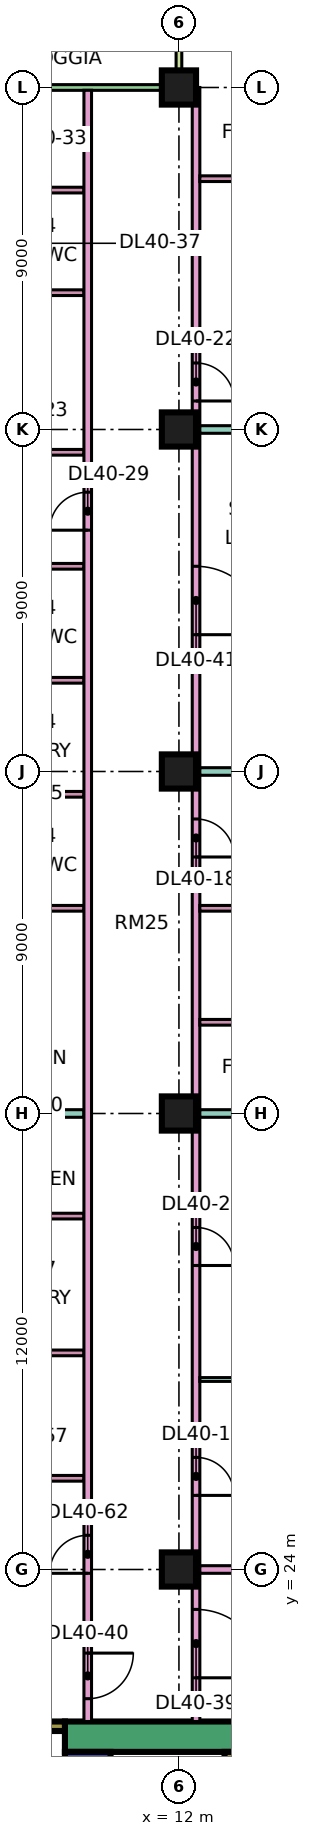
"""IFC4 building model, lengths in metres.
Left out: names, types, materials, properties, quantities, classifications, styles, units other than length and angle.
Written with IfcOpenShell. Run it as: python <this file> out.ifc"""

import sys

from ifc_helpers import new_model, si_unit, direction, frame, frame_2d, origin, origin_2d, place, context, subcontext, project, spatial, rectangle, extrude, element, fill, save


model = new_model("IFC4")
c1 = context("Model", 3, precision=1e-05, world=origin(), true_north=direction((0.0, 1.0)))
c2 = subcontext(c1, "Body", "Model", "MODEL_VIEW")
j1 = project(units=[si_unit("LENGTHUNIT", "METRE"), si_unit("PLANEANGLEUNIT", "RADIAN")], contexts=[c1])
p1 = place(None, origin())
s1 = spatial("IfcSite", under=j1, at=p1, CompositionType="ELEMENT")
p2 = place(p1, origin())
s2 = spatial("IfcBuilding", under=s1, at=p2, CompositionType="ELEMENT")
p3 = place(p2, frame((0.0, 0.0, 176.15)))
s3 = spatial("IfcBuildingStorey", under=s2, at=p3, CompositionType="ELEMENT", Elevation=176.15)
for number, where, z_axis, x_axis in (
    (1, (12.0, 24.0, 0.0), (0.0, 0.0, 1.0), (1.0, 0.0, 0.0)),
    (2, (12.0, 36.0, 0.0), (0.0, 0.0, 1.0), (1.0, 0.0, 0.0)),
    (3, (12.0, 45.0, 0.0), (0.0, 0.0, 1.0), (1.0, 0.0, 0.0)),
    (4, (12.0, 54.0, 0.0), (0.0, 0.0, 1.0), (1.0, 0.0, 0.0)),
    (5, (12.0, 63.0, 0.0), (0.0, 0.0, 1.0), (1.0, 0.0, 0.0)),
):
    element("IfcColumn", number, at=place(p3, frame(where, z_axis=z_axis, x_axis=x_axis)), inside=s3, PredefinedType="COLUMN", context=c2, shape_type="SweptSolid", body=[
        extrude(rectangle(XDim=0.9, YDim=0.9, at=origin_2d()), origin(), (0.0, 0.0, 1.0), 3.75),
    ])
p4 = place(p3, frame((9.0, 19.6, 0.0), z_axis=(0.0, 0.0, 1.0), x_axis=(1.0, 0.0, 0.0)))
e6 = element("IfcWall", 6, at=p4, inside=s3, PredefinedType="SHEAR", context=c2, shape_type="SweptSolid", body=[
    extrude(rectangle(XDim=25.0, YDim=0.8, at=frame_2d((12.5, 0.0))), origin(), (0.0, 0.0, 1.0), 3.75),
])
p5 = place(p4, frame((19.1, 0.0, 0.0)))
e7 = element("IfcOpeningElement", 7, at=p5, cuts=e6, PredefinedType="OPENING", context=c2, shape_type="SweptSolid", body=[
    extrude(rectangle(XDim=1.8, YDim=2.4, at=frame_2d((0.9, 1.2))), frame((0.0, 0.41, 0.0), z_axis=(0.0, -1.0, 0.0), x_axis=(1.0, 0.0, 0.0)), (0.0, 0.0, 1.0), 0.82),
])
p6 = place(p3, frame((9.6, 7.8, 0.0), z_axis=(0.0, 0.0, 1.0), x_axis=(0.0, 1.0, 0.0)))
e8 = element("IfcWall", 8, at=p6, inside=s3, PredefinedType="SHEAR", context=c2, shape_type="SweptSolid", body=[
    extrude(rectangle(XDim=11.4, YDim=1.2, at=frame_2d((5.7, 0.0))), origin(), (0.0, 0.0, 1.0), 3.75),
])
p7 = place(p6, frame((4.075, 0.0, 0.0)))
e9 = element("IfcOpeningElement", 9, at=p7, cuts=e8, PredefinedType="OPENING", context=c2, shape_type="SweptSolid", body=[
    extrude(rectangle(XDim=1.1, YDim=2.2, at=frame_2d((0.55, 1.1))), frame((0.0, 0.61, 0.0), z_axis=(0.0, -1.0, 0.0), x_axis=(1.0, 0.0, 0.0)), (0.0, 0.0, 1.0), 1.22),
])
p8 = place(p6, frame((6.575, 0.0, 0.0)))
e10 = element("IfcOpeningElement", 10, at=p8, cuts=e8, PredefinedType="OPENING", context=c2, shape_type="SweptSolid", body=[
    extrude(rectangle(XDim=1.1, YDim=2.2, at=frame_2d((0.55, 1.1))), frame((0.0, 0.61, 0.0), z_axis=(0.0, -1.0, 0.0), x_axis=(1.0, 0.0, 0.0)), (0.0, 0.0, 1.0), 1.22),
])
p9 = place(p6, frame((9.4, 0.0, 0.0)))
e11 = element("IfcOpeningElement", 11, at=p9, cuts=e8, PredefinedType="OPENING", context=c2, shape_type="SweptSolid", body=[
    extrude(rectangle(XDim=1.1, YDim=2.2, at=frame_2d((0.55, 1.1))), frame((0.0, 0.61, 0.0), z_axis=(0.0, -1.0, 0.0), x_axis=(1.0, 0.0, 0.0)), (0.0, 0.0, 1.0), 1.22),
])
p10 = place(p6, frame((1.75, 0.0, 0.0)))
e12 = element("IfcOpeningElement", 12, at=p10, cuts=e8, PredefinedType="OPENING", context=c2, shape_type="SweptSolid", body=[
    extrude(rectangle(XDim=0.9, YDim=2.1, at=frame_2d((0.45, 1.05))), frame((0.0, 0.61, 0.0), z_axis=(0.0, -1.0, 0.0), x_axis=(1.0, 0.0, 0.0)), (0.0, 0.0, 1.0), 1.22),
])
p11 = place(p3, frame((13.325, 7.8, 0.0), z_axis=(0.0, 0.0, 1.0), x_axis=(0.0, 1.0, 0.0)))
e13 = element("IfcWall", 13, at=p11, inside=s3, PredefinedType="SHEAR", context=c2, shape_type="SweptSolid", body=[
    extrude(rectangle(XDim=11.4, YDim=0.25, at=frame_2d((5.7, 0.0))), origin(), (0.0, 0.0, 1.0), 3.75),
])
p12 = place(p3, frame((2.1, 19.875, 0.0), z_axis=(0.0, 0.0, 1.0), x_axis=(1.0, 0.0, 0.0)))
e14 = element("IfcWall", 14, at=p12, inside=s3, PredefinedType="SHEAR", context=c2, shape_type="SweptSolid", body=[
    extrude(rectangle(XDim=6.9, YDim=0.25, at=frame_2d((3.45, 0.0))), origin(), (0.0, 0.0, 1.0), 3.75),
])
p13 = place(p12, frame((1.175, 0.0, 0.0)))
e15 = element("IfcOpeningElement", 15, at=p13, cuts=e14, PredefinedType="OPENING", context=c2, shape_type="SweptSolid", body=[
    extrude(rectangle(XDim=1.1, YDim=2.2, at=frame_2d((0.55, 1.1))), frame((0.0, 0.135, 0.0), z_axis=(0.0, -1.0, 0.0), x_axis=(1.0, 0.0, 0.0)), (0.0, 0.0, 1.0), 0.27),
])
p14 = place(p12, frame((4.6, 0.0, 0.0)))
e16 = element("IfcOpeningElement", 16, at=p14, cuts=e14, PredefinedType="OPENING", context=c2, shape_type="SweptSolid", body=[
    extrude(rectangle(XDim=1.2, YDim=2.2, at=frame_2d((0.6, 1.1))), frame((0.0, 0.135, 0.0), z_axis=(0.0, -1.0, 0.0), x_axis=(1.0, 0.0, 0.0)), (0.0, 0.0, 1.0), 0.27),
])
p15 = place(p3, frame((11.925, 63.0, 0.0), z_axis=(0.0, 0.0, 1.0), x_axis=(-1.0, 0.0, 0.0)))
e17 = element("IfcWall", 17, at=p15, inside=s3, PredefinedType="SOLIDWALL", context=c2, shape_type="SweptSolid", body=[
    extrude(rectangle(XDim=10.35, YDim=0.15, at=frame_2d((5.175, 0.0))), origin(), (0.0, 0.0, 1.0), 3.35),
])
p16 = place(p15, frame((7.688, 0.0, 0.0)))
e18 = element("IfcOpeningElement", 18, at=p16, cuts=e17, PredefinedType="OPENING", context=c2, shape_type="SweptSolid", body=[
    extrude(rectangle(XDim=1.8, YDim=2.4, at=frame_2d((0.9, 1.2))), frame((0.0, 0.085, 0.0), z_axis=(0.0, -1.0, 0.0), x_axis=(1.0, 0.0, 0.0)), (0.0, 0.0, 1.0), 0.17),
])
p17 = place(p3, frame((12.0, 64.5, 0.0), z_axis=(0.0, 0.0, 1.0), x_axis=(0.0, -1.0, 0.0)))
e19 = element("IfcWall", 19, at=p17, inside=s3, PredefinedType="SOLIDWALL", context=c2, shape_type="SweptSolid", body=[
    extrude(rectangle(XDim=1.5, YDim=0.15, at=frame_2d((0.75, 0.0))), origin(), (0.0, 0.0, 1.0), 3.35),
])
p18 = place(p3, frame((-1.35, 22.4, 0.0), z_axis=(0.0, 0.0, 1.0), x_axis=(1.0, 0.0, 0.0)))
e20 = element("IfcWall", 20, at=p18, inside=s3, PredefinedType="PARTITIONING", context=c2, shape_type="SweptSolid", body=[
    extrude(rectangle(XDim=10.85, YDim=0.2, at=frame_2d((5.425, 0.0))), origin(), (0.0, 0.0, 1.0), 3.35),
])
p19 = place(p3, frame((0.0, 36.0, 0.0), z_axis=(0.0, 0.0, 1.0), x_axis=(1.0, 0.0, 0.0)))
e21 = element("IfcWall", 21, at=p19, inside=s3, PredefinedType="PARTITIONING", context=c2, shape_type="SweptSolid", body=[
    extrude(rectangle(XDim=9.5, YDim=0.2, at=frame_2d((4.75, 0.0))), origin(), (0.0, 0.0, 1.0), 3.35),
])
p20 = place(p3, frame((6.375, 26.4, 0.0), z_axis=(0.0, 0.0, 1.0), x_axis=(1.0, 0.0, 0.0)))
e22 = element("IfcWall", 22, at=p20, inside=s3, PredefinedType="PARTITIONING", context=c2, shape_type="SweptSolid", body=[
    extrude(rectangle(XDim=3.125, YDim=0.15, at=frame_2d((1.562, 0.0))), origin(), (0.0, 0.0, 1.0), 3.35),
])
p21 = place(p20, frame((1.225, 0.0, 0.0)))
e23 = element("IfcOpeningElement", 23, at=p21, cuts=e22, PredefinedType="OPENING", context=c2, shape_type="SweptSolid", body=[
    extrude(rectangle(XDim=0.8, YDim=2.1, at=frame_2d((0.4, 1.05))), frame((0.0, 0.085, 0.0), z_axis=(0.0, -1.0, 0.0), x_axis=(1.0, 0.0, 0.0)), (0.0, 0.0, 1.0), 0.17),
])
for number, where, z_axis, x_axis in (
    (24, (6.375, 29.7, 0.0), (0.0, 0.0, 1.0), (1.0, 0.0, 0.0)),
    (25, (6.375, 33.3, 0.0), (0.0, 0.0, 1.0), (1.0, 0.0, 0.0)),
    (26, (6.375, 41.4, 0.0), (0.0, 0.0, 1.0), (1.0, 0.0, 0.0)),
    (27, (6.375, 44.4, 0.0), (0.0, 0.0, 1.0), (1.0, 0.0, 0.0)),
    (28, (6.375, 47.4, 0.0), (0.0, 0.0, 1.0), (1.0, 0.0, 0.0)),
    (29, (6.375, 50.4, 0.0), (0.0, 0.0, 1.0), (1.0, 0.0, 0.0)),
):
    element("IfcWall", number, at=place(p3, frame(where, z_axis=z_axis, x_axis=x_axis)), inside=s3, PredefinedType="PARTITIONING", context=c2, shape_type="SweptSolid", body=[
        extrude(rectangle(XDim=3.125, YDim=0.15, at=frame_2d((1.562, 0.0))), origin(), (0.0, 0.0, 1.0), 3.35),
    ])
p22 = place(p3, frame((6.375, 53.4, 0.0), z_axis=(0.0, 0.0, 1.0), x_axis=(1.0, 0.0, 0.0)))
e30 = element("IfcWall", 30, at=p22, inside=s3, PredefinedType="PARTITIONING", context=c2, shape_type="SweptSolid", body=[
    extrude(rectangle(XDim=3.125, YDim=0.15, at=frame_2d((1.562, 0.0))), origin(), (0.0, 0.0, 1.0), 3.35),
])
p23 = place(p22, frame((1.225, 0.0, 0.0)))
e31 = element("IfcOpeningElement", 31, at=p23, cuts=e30, PredefinedType="OPENING", context=c2, shape_type="SweptSolid", body=[
    extrude(rectangle(XDim=0.8, YDim=2.1, at=frame_2d((0.4, 1.05))), frame((0.0, 0.085, 0.0), z_axis=(0.0, -1.0, 0.0), x_axis=(1.0, 0.0, 0.0)), (0.0, 0.0, 1.0), 0.17),
])
for number, where, z_axis, x_axis in (
    (32, (6.375, 57.6, 0.0), (0.0, 0.0, 1.0), (1.0, 0.0, 0.0)),
    (33, (6.375, 60.3, 0.0), (0.0, 0.0, 1.0), (1.0, 0.0, 0.0)),
):
    element("IfcWall", number, at=place(p3, frame(where, z_axis=z_axis, x_axis=x_axis)), inside=s3, PredefinedType="PARTITIONING", context=c2, shape_type="SweptSolid", body=[
        extrude(rectangle(XDim=3.125, YDim=0.15, at=frame_2d((1.562, 0.0))), origin(), (0.0, 0.0, 1.0), 3.35),
    ])
p24 = place(p3, frame((9.6, 20.0, 0.0), z_axis=(0.0, 0.0, 1.0), x_axis=(0.0, 1.0, 0.0)))
e34 = element("IfcWall", 34, at=p24, inside=s3, PredefinedType="PARTITIONING", context=c2, shape_type="SweptSolid", body=[
    extrude(rectangle(XDim=42.926, YDim=0.2, at=frame_2d((21.463, 0.0))), origin(), (0.0, 0.0, 1.0), 3.35),
])
p25 = place(p24, frame((31.35, 0.0, 0.0)))
e35 = element("IfcOpeningElement", 35, at=p25, cuts=e34, PredefinedType="OPENING", context=c2, shape_type="SweptSolid", body=[
    extrude(rectangle(XDim=1.0, YDim=2.1, at=frame_2d((0.5, 1.05))), frame((0.0, 0.11, 0.0), z_axis=(0.0, -1.0, 0.0), x_axis=(1.0, 0.0, 0.0)), (0.0, 0.0, 1.0), 0.22),
])
p26 = place(p24, frame((0.6, 0.0, 0.0)))
e36 = element("IfcOpeningElement", 36, at=p26, cuts=e34, PredefinedType="OPENING", context=c2, shape_type="SweptSolid", body=[
    extrude(rectangle(XDim=1.2, YDim=2.1, at=frame_2d((0.6, 1.05))), frame((0.0, 0.11, 0.0), z_axis=(0.0, -1.0, 0.0), x_axis=(1.0, 0.0, 0.0)), (0.0, 0.0, 1.0), 0.22),
])
p27 = place(p24, frame((3.9, 0.0, 0.0)))
e37 = element("IfcOpeningElement", 37, at=p27, cuts=e34, PredefinedType="OPENING", context=c2, shape_type="SweptSolid", body=[
    extrude(rectangle(XDim=1.0, YDim=2.1, at=frame_2d((0.5, 1.05))), frame((0.0, 0.11, 0.0), z_axis=(0.0, -1.0, 0.0), x_axis=(1.0, 0.0, 0.0)), (0.0, 0.0, 1.0), 0.22),
])
p28 = place(p3, frame((12.45, 20.0, 0.0), z_axis=(0.0, 0.0, 1.0), x_axis=(0.0, 1.0, 0.0)))
e38 = element("IfcWall", 38, at=p28, inside=s3, PredefinedType="PARTITIONING", context=c2, shape_type="SweptSolid", body=[
    extrude(rectangle(XDim=43.0, YDim=0.2, at=frame_2d((21.5, 0.0))), origin(), (0.0, 0.0, 1.0), 3.35),
])
p29 = place(p28, frame((5.95, 0.0, 0.0)))
e39 = element("IfcOpeningElement", 39, at=p29, cuts=e38, PredefinedType="OPENING", context=c2, shape_type="SweptSolid", body=[
    extrude(rectangle(XDim=1.0, YDim=2.1, at=frame_2d((0.5, 1.05))), frame((0.0, 0.11, 0.0), z_axis=(0.0, -1.0, 0.0), x_axis=(1.0, 0.0, 0.0)), (0.0, 0.0, 1.0), 0.22),
])
p30 = place(p28, frame((12.0, 0.0, 0.0)))
e40 = element("IfcOpeningElement", 40, at=p30, cuts=e38, PredefinedType="OPENING", context=c2, shape_type="SweptSolid", body=[
    extrude(rectangle(XDim=1.0, YDim=2.1, at=frame_2d((0.5, 1.05))), frame((0.0, 0.11, 0.0), z_axis=(0.0, -1.0, 0.0), x_axis=(1.0, 0.0, 0.0)), (0.0, 0.0, 1.0), 0.22),
])
p31 = place(p28, frame((22.75, 0.0, 0.0)))
e41 = element("IfcOpeningElement", 41, at=p31, cuts=e38, PredefinedType="OPENING", context=c2, shape_type="SweptSolid", body=[
    extrude(rectangle(XDim=1.0, YDim=2.1, at=frame_2d((0.5, 1.05))), frame((0.0, 0.11, 0.0), z_axis=(0.0, -1.0, 0.0), x_axis=(1.0, 0.0, 0.0)), (0.0, 0.0, 1.0), 0.22),
])
p32 = place(p28, frame((34.75, 0.0, 0.0)))
e42 = element("IfcOpeningElement", 42, at=p32, cuts=e38, PredefinedType="OPENING", context=c2, shape_type="SweptSolid", body=[
    extrude(rectangle(XDim=1.0, YDim=2.1, at=frame_2d((0.5, 1.05))), frame((0.0, 0.11, 0.0), z_axis=(0.0, -1.0, 0.0), x_axis=(1.0, 0.0, 0.0)), (0.0, 0.0, 1.0), 0.22),
])
p33 = place(p28, frame((1.15, 0.0, 0.0)))
e43 = element("IfcOpeningElement", 43, at=p33, cuts=e38, PredefinedType="OPENING", context=c2, shape_type="SweptSolid", body=[
    extrude(rectangle(XDim=1.8, YDim=2.1, at=frame_2d((0.9, 1.05))), frame((0.0, 0.11, 0.0), z_axis=(0.0, -1.0, 0.0), x_axis=(1.0, 0.0, 0.0)), (0.0, 0.0, 1.0), 0.22),
])
p34 = place(p28, frame((28.6, 0.0, 0.0)))
e44 = element("IfcOpeningElement", 44, at=p34, cuts=e38, PredefinedType="OPENING", context=c2, shape_type="SweptSolid", body=[
    extrude(rectangle(XDim=1.8, YDim=2.1, at=frame_2d((0.9, 1.05))), frame((0.0, 0.11, 0.0), z_axis=(0.0, -1.0, 0.0), x_axis=(1.0, 0.0, 0.0)), (0.0, 0.0, 1.0), 0.22),
])
p35 = place(p3, frame((12.55, 24.0, 0.0), z_axis=(0.0, 0.0, 1.0), x_axis=(1.0, 0.0, 0.0)))
e45 = element("IfcWall", 45, at=p35, inside=s3, PredefinedType="PARTITIONING", context=c2, shape_type="SweptSolid", body=[
    extrude(rectangle(XDim=8.95, YDim=0.2, at=frame_2d((4.475, 0.0))), origin(), (0.0, 0.0, 1.0), 3.35),
])
p36 = place(p3, frame((12.55, 29.0, 0.0), z_axis=(0.0, 0.0, 1.0), x_axis=(1.0, 0.0, 0.0)))
e46 = element("IfcWall", 46, at=p36, inside=s3, PredefinedType="PARTITIONING", context=c2, shape_type="SweptSolid", body=[
    extrude(rectangle(XDim=8.95, YDim=0.1, at=frame_2d((4.475, 0.0))), origin(), (0.0, 0.0, 1.0), 3.35),
])
p37 = place(p3, frame((12.55, 36.0, 0.0), z_axis=(0.0, 0.0, 1.0), x_axis=(1.0, 0.0, 0.0)))
e47 = element("IfcWall", 47, at=p37, inside=s3, PredefinedType="PARTITIONING", context=c2, shape_type="SweptSolid", body=[
    extrude(rectangle(XDim=11.45, YDim=0.2, at=frame_2d((5.725, 0.0))), origin(), (0.0, 0.0, 1.0), 3.35),
])
p38 = place(p3, frame((12.55, 38.4, 0.0), z_axis=(0.0, 0.0, 1.0), x_axis=(1.0, 0.0, 0.0)))
e48 = element("IfcWall", 48, at=p38, inside=s3, PredefinedType="PARTITIONING", context=c2, shape_type="SweptSolid", body=[
    extrude(rectangle(XDim=5.225, YDim=0.15, at=frame_2d((2.612, 0.0))), origin(), (0.0, 0.0, 1.0), 3.35),
])
p39 = place(p3, frame((12.55, 41.4, 0.0), z_axis=(0.0, 0.0, 1.0), x_axis=(1.0, 0.0, 0.0)))
e49 = element("IfcWall", 49, at=p39, inside=s3, PredefinedType="PARTITIONING", context=c2, shape_type="SweptSolid", body=[
    extrude(rectangle(XDim=5.375, YDim=0.15, at=frame_2d((2.688, 0.0))), origin(), (0.0, 0.0, 1.0), 3.35),
])
p40 = place(p3, frame((12.55, 45.0, 0.0), z_axis=(0.0, 0.0, 1.0), x_axis=(1.0, 0.0, 0.0)))
e50 = element("IfcWall", 50, at=p40, inside=s3, PredefinedType="PARTITIONING", context=c2, shape_type="SweptSolid", body=[
    extrude(rectangle(XDim=11.45, YDim=0.2, at=frame_2d((5.725, 0.0))), origin(), (0.0, 0.0, 1.0), 3.35),
])
p41 = place(p3, frame((12.55, 54.0, 0.0), z_axis=(0.0, 0.0, 1.0), x_axis=(1.0, 0.0, 0.0)))
e51 = element("IfcWall", 51, at=p41, inside=s3, PredefinedType="PARTITIONING", context=c2, shape_type="SweptSolid", body=[
    extrude(rectangle(XDim=11.376, YDim=0.2, at=frame_2d((5.688, 0.0))), origin(), (0.0, 0.0, 1.0), 3.35),
])
for number, where, z_axis, x_axis in (
    (52, (12.55, 56.4, 0.0), (0.0, 0.0, 1.0), (1.0, 0.0, 0.0)),
    (53, (12.55, 60.6, 0.0), (0.0, 0.0, 1.0), (1.0, 0.0, 0.0)),
):
    element("IfcWall", number, at=place(p3, frame(where, z_axis=z_axis, x_axis=x_axis)), inside=s3, PredefinedType="PARTITIONING", context=c2, shape_type="SweptSolid", body=[
        extrude(rectangle(XDim=5.225, YDim=0.15, at=frame_2d((2.612, 0.0))), origin(), (0.0, 0.0, 1.0), 3.35),
    ])
p42 = place(p29, frame((1.0, 0.0, 0.0), z_axis=(0.0, 0.0, 1.0), x_axis=(-1.0, 0.0, 0.0)))
e54 = element("IfcDoor", 54, at=p42, inside=s3, OperationType="SINGLE_SWING_LEFT", PredefinedType="DOOR", context=c2, shape_type="SweptSolid", body=[
    extrude(rectangle(XDim=1.0, YDim=2.1, at=frame_2d((0.5, 1.05))), frame((0.0, 0.025, 0.0), z_axis=(0.0, -1.0, 0.0), x_axis=(1.0, 0.0, 0.0)), (0.0, 0.0, 1.0), 0.05),
])
fill(e39, e54)
p43 = place(p30, frame((1.0, 0.0, 0.0), z_axis=(0.0, 0.0, 1.0), x_axis=(-1.0, 0.0, 0.0)))
e55 = element("IfcDoor", 55, at=p43, inside=s3, OperationType="SINGLE_SWING_LEFT", PredefinedType="DOOR", context=c2, shape_type="SweptSolid", body=[
    extrude(rectangle(XDim=1.0, YDim=2.1, at=frame_2d((0.5, 1.05))), frame((0.0, 0.025, 0.0), z_axis=(0.0, -1.0, 0.0), x_axis=(1.0, 0.0, 0.0)), (0.0, 0.0, 1.0), 0.05),
])
fill(e40, e55)
p44 = place(p31, frame((1.0, 0.0, 0.0), z_axis=(0.0, 0.0, 1.0), x_axis=(-1.0, 0.0, 0.0)))
e56 = element("IfcDoor", 56, at=p44, inside=s3, OperationType="SINGLE_SWING_LEFT", PredefinedType="DOOR", context=c2, shape_type="SweptSolid", body=[
    extrude(rectangle(XDim=1.0, YDim=2.1, at=frame_2d((0.5, 1.05))), frame((0.0, 0.025, 0.0), z_axis=(0.0, -1.0, 0.0), x_axis=(1.0, 0.0, 0.0)), (0.0, 0.0, 1.0), 0.05),
])
fill(e41, e56)
p45 = place(p32, frame((1.0, 0.0, 0.0), z_axis=(0.0, 0.0, 1.0), x_axis=(-1.0, 0.0, 0.0)))
e57 = element("IfcDoor", 57, at=p45, inside=s3, OperationType="SINGLE_SWING_LEFT", PredefinedType="DOOR", context=c2, shape_type="SweptSolid", body=[
    extrude(rectangle(XDim=1.0, YDim=2.1, at=frame_2d((0.5, 1.05))), frame((0.0, 0.025, 0.0), z_axis=(0.0, -1.0, 0.0), x_axis=(1.0, 0.0, 0.0)), (0.0, 0.0, 1.0), 0.05),
])
fill(e42, e57)
p46 = place(p25, origin())
e58 = element("IfcDoor", 58, at=p46, inside=s3, OperationType="SINGLE_SWING_LEFT", PredefinedType="DOOR", context=c2, shape_type="SweptSolid", body=[
    extrude(rectangle(XDim=1.0, YDim=2.1, at=frame_2d((0.5, 1.05))), frame((0.0, 0.025, 0.0), z_axis=(0.0, -1.0, 0.0), x_axis=(1.0, 0.0, 0.0)), (0.0, 0.0, 1.0), 0.05),
])
fill(e35, e58)
p47 = place(p33, frame((1.8, 0.0, 0.0), z_axis=(0.0, 0.0, 1.0), x_axis=(-1.0, 0.0, 0.0)))
e59 = element("IfcDoor", 59, at=p47, inside=s3, OperationType="DOUBLE_DOOR_SINGLE_SWING", PredefinedType="DOOR", context=c2, shape_type="SweptSolid", body=[
    extrude(rectangle(XDim=1.8, YDim=2.1, at=frame_2d((0.9, 1.05))), frame((0.0, 0.025, 0.0), z_axis=(0.0, -1.0, 0.0), x_axis=(1.0, 0.0, 0.0)), (0.0, 0.0, 1.0), 0.05),
])
fill(e43, e59)
p48 = place(p26, origin())
e60 = element("IfcDoor", 60, at=p48, inside=s3, OperationType="SINGLE_SWING_RIGHT", PredefinedType="DOOR", context=c2, shape_type="SweptSolid", body=[
    extrude(rectangle(XDim=1.2, YDim=2.1, at=frame_2d((0.6, 1.05))), frame((0.0, 0.025, 0.0), z_axis=(0.0, -1.0, 0.0), x_axis=(1.0, 0.0, 0.0)), (0.0, 0.0, 1.0), 0.05),
])
fill(e36, e60)
p49 = place(p34, frame((1.8, 0.0, 0.0), z_axis=(0.0, 0.0, 1.0), x_axis=(-1.0, 0.0, 0.0)))
e61 = element("IfcDoor", 61, at=p49, inside=s3, OperationType="DOUBLE_DOOR_SINGLE_SWING", PredefinedType="DOOR", context=c2, shape_type="SweptSolid", body=[
    extrude(rectangle(XDim=1.8, YDim=2.1, at=frame_2d((0.9, 1.05))), frame((0.0, 0.025, 0.0), z_axis=(0.0, -1.0, 0.0), x_axis=(1.0, 0.0, 0.0)), (0.0, 0.0, 1.0), 0.05),
])
fill(e44, e61)
p50 = place(p27, origin())
e62 = element("IfcDoor", 62, at=p50, inside=s3, OperationType="SINGLE_SWING_LEFT", PredefinedType="DOOR", context=c2, shape_type="SweptSolid", body=[
    extrude(rectangle(XDim=1.0, YDim=2.1, at=frame_2d((0.5, 1.05))), frame((0.0, 0.025, 0.0), z_axis=(0.0, -1.0, 0.0), x_axis=(1.0, 0.0, 0.0)), (0.0, 0.0, 1.0), 0.05),
])
fill(e37, e62)
save(model, sys.argv[1])
